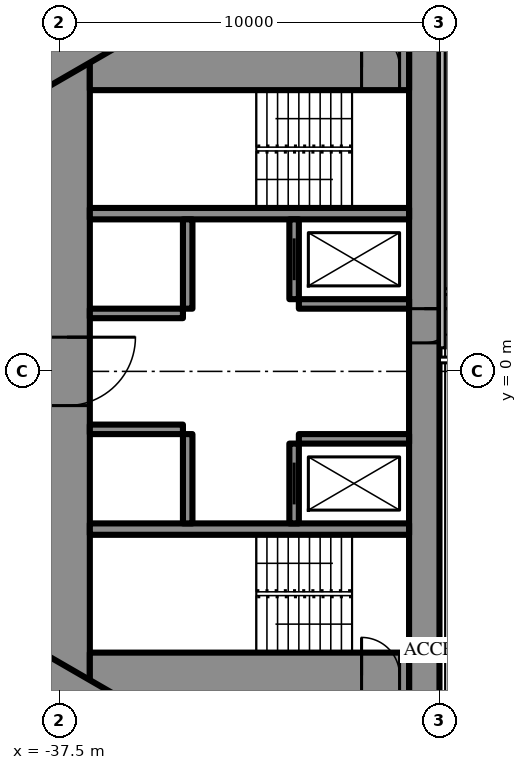
"""IFC4 building model, lengths in metres.
Left out: names, types, materials, properties, quantities, classifications, styles, units other than length and angle.
Written with IfcOpenShell. Run it as: python <this file> out.ifc"""

import sys

from ifc_helpers import new_model, si_unit, direction, frame, frame_2d, origin, place, context, subcontext, project, spatial, rectangle, extrude, element, fill, save


model = new_model("IFC4")
c1 = context("Model", 3, precision=1e-05, world=origin(), true_north=direction((0.0, 1.0)))
c2 = subcontext(c1, "Body", "Model", "MODEL_VIEW")
j1 = project(units=[si_unit("LENGTHUNIT", "METRE"), si_unit("PLANEANGLEUNIT", "RADIAN")], contexts=[c1])
p1 = place(None, origin())
s1 = spatial("IfcSite", under=j1, at=p1, CompositionType="ELEMENT")
p2 = place(p1, origin())
s2 = spatial("IfcBuilding", under=s1, at=p2, CompositionType="ELEMENT")
p3 = place(p2, frame((0.0, 0.0, 218.9)))
s3 = spatial("IfcBuildingStorey", under=s2, at=p3, CompositionType="ELEMENT", Elevation=218.9)
p4 = place(p3, frame((-27.9, 8.6, 0.0), z_axis=(0.0, 0.0, 1.0), x_axis=(0.0, -1.0, 0.0)))
e1 = element("IfcWall", 1, at=p4, inside=s3, PredefinedType="SHEAR", context=c2, shape_type="SweptSolid", body=[
    extrude(rectangle(XDim=17.2, YDim=0.8, at=frame_2d((8.6, 0.0))), origin(), (0.0, 0.0, 1.0), 3.6),
])
p5 = place(p4, frame((6.95, 0.0, 0.0)))
e2 = element("IfcOpeningElement", 2, at=p5, cuts=e1, PredefinedType="OPENING", context=c2, shape_type="SweptSolid", body=[
    extrude(rectangle(XDim=0.9, YDim=2.2, at=frame_2d((0.45, 1.1))), frame((0.0, 0.41, 0.0), z_axis=(0.0, -1.0, 0.0), x_axis=(1.0, 0.0, 0.0)), (0.0, 0.0, 1.0), 0.82),
])
p6 = place(p3, frame((-37.3, 8.6, 0.0), z_axis=(0.0, 0.0, 1.0), x_axis=(0.0, -1.0, 0.0)))
e3 = element("IfcWall", 3, at=p6, inside=s3, PredefinedType="SHEAR", context=c2, shape_type="SweptSolid", body=[
    extrude(rectangle(XDim=17.2, YDim=1.2, at=frame_2d((8.6, 0.0))), origin(), (0.0, 0.0, 1.0), 3.6),
])
p7 = place(p6, frame((7.7, 0.0, 0.0)))
e4 = element("IfcOpeningElement", 4, at=p7, cuts=e3, PredefinedType="OPENING", context=c2, shape_type="SweptSolid", body=[
    extrude(rectangle(XDim=1.8, YDim=2.2, at=frame_2d((0.9, 1.1))), frame((0.0, 0.61, 0.0), z_axis=(0.0, -1.0, 0.0), x_axis=(1.0, 0.0, 0.0)), (0.0, 0.0, 1.0), 1.22),
])
p8 = place(p3, frame((-28.3, 8.0, 0.0), z_axis=(0.0, 0.0, 1.0), x_axis=(-1.0, 0.0, 0.0)))
e5 = element("IfcWall", 5, at=p8, inside=s3, PredefinedType="SHEAR", context=c2, shape_type="SweptSolid", body=[
    extrude(rectangle(XDim=8.4, YDim=1.2, at=frame_2d((4.2, 0.0))), origin(), (0.0, 0.0, 1.0), 3.6),
])
p9 = place(p8, frame((0.25, 0.0, 0.0)))
e6 = element("IfcOpeningElement", 6, at=p9, cuts=e5, PredefinedType="OPENING", context=c2, shape_type="SweptSolid", body=[
    extrude(rectangle(XDim=1.0, YDim=2.2, at=frame_2d((0.5, 1.1))), frame((0.0, 0.61, 0.0), z_axis=(0.0, -1.0, 0.0), x_axis=(1.0, 0.0, 0.0)), (0.0, 0.0, 1.0), 1.22),
])
p10 = place(p3, frame((-28.3, -8.0, 0.0), z_axis=(0.0, 0.0, 1.0), x_axis=(-1.0, 0.0, 0.0)))
e7 = element("IfcWall", 7, at=p10, inside=s3, PredefinedType="SHEAR", context=c2, shape_type="SweptSolid", body=[
    extrude(rectangle(XDim=8.4, YDim=1.2, at=frame_2d((4.2, 0.0))), origin(), (0.0, 0.0, 1.0), 3.6),
])
p11 = place(p10, frame((0.25, 0.0, 0.0)))
e8 = element("IfcOpeningElement", 8, at=p11, cuts=e7, PredefinedType="OPENING", context=c2, shape_type="SweptSolid", body=[
    extrude(rectangle(XDim=1.0, YDim=2.2, at=frame_2d((0.5, 1.1))), frame((0.0, 0.61, 0.0), z_axis=(0.0, -1.0, 0.0), x_axis=(1.0, 0.0, 0.0)), (0.0, 0.0, 1.0), 1.22),
])
for number, where, z_axis, x_axis in (
    (9, (-28.3, 4.15, 0.0), (0.0, 0.0, 1.0), (-1.0, 0.0, 0.0)),
    (10, (-28.3, -4.15, 0.0), (0.0, 0.0, 1.0), (-1.0, 0.0, 0.0)),
):
    element("IfcWall", number, at=place(p3, frame(where, z_axis=z_axis, x_axis=x_axis)), inside=s3, PredefinedType="SHEAR", context=c2, shape_type="SweptSolid", body=[
        extrude(rectangle(XDim=8.4, YDim=0.3, at=frame_2d((4.2, 0.0))), origin(), (0.0, 0.0, 1.0), 3.6),
    ])
p12 = place(p3, frame((-31.325, 4.0, 0.0), z_axis=(0.0, 0.0, 1.0), x_axis=(0.0, -1.0, 0.0)))
e11 = element("IfcWall", 11, at=p12, inside=s3, PredefinedType="SHEAR", context=c2, shape_type="SweptSolid", body=[
    extrude(rectangle(XDim=2.1, YDim=0.25, at=frame_2d((1.05, 0.0))), origin(), (0.0, 0.0, 1.0), 3.6),
])
p13 = place(p12, frame((0.5, 0.0, 0.0)))
e12 = element("IfcOpeningElement", 12, at=p13, cuts=e11, PredefinedType="OPENING", context=c2, shape_type="SweptSolid", body=[
    extrude(rectangle(XDim=1.1, YDim=2.2, at=frame_2d((0.55, 1.1))), frame((0.0, 0.135, 0.0), z_axis=(0.0, -1.0, 0.0), x_axis=(1.0, 0.0, 0.0)), (0.0, 0.0, 1.0), 0.27),
])
p14 = place(p3, frame((-34.125, 4.0, 0.0), z_axis=(0.0, 0.0, 1.0), x_axis=(0.0, -1.0, 0.0)))
e13 = element("IfcWall", 13, at=p14, inside=s3, PredefinedType="SHEAR", context=c2, shape_type="SweptSolid", body=[
    extrude(rectangle(XDim=2.35, YDim=0.25, at=frame_2d((1.175, 0.0))), origin(), (0.0, 0.0, 1.0), 3.6),
])
p15 = place(p3, frame((-28.3, 1.775, 0.0), z_axis=(0.0, 0.0, 1.0), x_axis=(-1.0, 0.0, 0.0)))
e14 = element("IfcWall", 14, at=p15, inside=s3, PredefinedType="SHEAR", context=c2, shape_type="SweptSolid", body=[
    extrude(rectangle(XDim=2.9, YDim=0.25, at=frame_2d((1.45, 0.0))), origin(), (0.0, 0.0, 1.0), 3.6),
])
p16 = place(p3, frame((-34.25, 1.525, 0.0), z_axis=(0.0, 0.0, 1.0), x_axis=(-1.0, 0.0, 0.0)))
e15 = element("IfcWall", 15, at=p16, inside=s3, PredefinedType="SHEAR", context=c2, shape_type="SweptSolid", body=[
    extrude(rectangle(XDim=2.45, YDim=0.25, at=frame_2d((1.225, 0.0))), origin(), (0.0, 0.0, 1.0), 3.6),
])
p17 = place(p3, frame((-31.325, -1.9, 0.0), z_axis=(0.0, 0.0, 1.0), x_axis=(0.0, -1.0, 0.0)))
e16 = element("IfcWall", 16, at=p17, inside=s3, PredefinedType="SHEAR", context=c2, shape_type="SweptSolid", body=[
    extrude(rectangle(XDim=2.1, YDim=0.25, at=frame_2d((1.05, 0.0))), origin(), (0.0, 0.0, 1.0), 3.6),
])
p18 = place(p17, frame((0.5, 0.0, 0.0)))
e17 = element("IfcOpeningElement", 17, at=p18, cuts=e16, PredefinedType="OPENING", context=c2, shape_type="SweptSolid", body=[
    extrude(rectangle(XDim=1.1, YDim=2.2, at=frame_2d((0.55, 1.1))), frame((0.0, 0.135, 0.0), z_axis=(0.0, -1.0, 0.0), x_axis=(1.0, 0.0, 0.0)), (0.0, 0.0, 1.0), 0.27),
])
p19 = place(p3, frame((-34.125, -1.65, 0.0), z_axis=(0.0, 0.0, 1.0), x_axis=(0.0, -1.0, 0.0)))
e18 = element("IfcWall", 18, at=p19, inside=s3, PredefinedType="SHEAR", context=c2, shape_type="SweptSolid", body=[
    extrude(rectangle(XDim=2.35, YDim=0.25, at=frame_2d((1.175, 0.0))), origin(), (0.0, 0.0, 1.0), 3.6),
])
p20 = place(p3, frame((-28.3, -1.775, 0.0), z_axis=(0.0, 0.0, 1.0), x_axis=(-1.0, 0.0, 0.0)))
e19 = element("IfcWall", 19, at=p20, inside=s3, PredefinedType="SHEAR", context=c2, shape_type="SweptSolid", body=[
    extrude(rectangle(XDim=2.9, YDim=0.25, at=frame_2d((1.45, 0.0))), origin(), (0.0, 0.0, 1.0), 3.6),
])
p21 = place(p3, frame((-34.25, -1.525, 0.0), z_axis=(0.0, 0.0, 1.0), x_axis=(-1.0, 0.0, 0.0)))
e20 = element("IfcWall", 20, at=p21, inside=s3, PredefinedType="SHEAR", context=c2, shape_type="SweptSolid", body=[
    extrude(rectangle(XDim=2.45, YDim=0.25, at=frame_2d((1.225, 0.0))), origin(), (0.0, 0.0, 1.0), 3.6),
])
p22 = place(p3, frame((-27.2, 14.3, 0.0), z_axis=(0.0, 0.0, 1.0), x_axis=(-0.866026593062, -0.499997940104, 0.0)))
e21 = element("IfcWall", 21, at=p22, inside=s3, PredefinedType="SHEAR", context=c2, shape_type="SweptSolid", body=[
    extrude(rectangle(XDim=28.946, YDim=1.2, at=frame_2d((14.473, 0.0))), origin(), (0.0, 0.0, 1.0), 3.6),
])
p23 = place(p22, frame((4.6, 0.0, 0.0)))
e22 = element("IfcOpeningElement", 22, at=p23, cuts=e21, PredefinedType="OPENING", context=c2, shape_type="SweptSolid", body=[
    extrude(rectangle(XDim=1.0, YDim=2.2, at=frame_2d((0.5, 1.1))), frame((0.0, 0.61, 0.0), z_axis=(0.0, -1.0, 0.0), x_axis=(1.0, 0.0, 0.0)), (0.0, 0.0, 1.0), 1.22),
])
p24 = place(p22, frame((13.395, 0.0, 0.0)))
e23 = element("IfcOpeningElement", 23, at=p24, cuts=e21, PredefinedType="OPENING", context=c2, shape_type="SweptSolid", body=[
    extrude(rectangle(XDim=1.8, YDim=2.2, at=frame_2d((0.9, 1.1))), frame((0.0, 0.61, 0.0), z_axis=(0.0, -1.0, 0.0), x_axis=(1.0, 0.0, 0.0)), (0.0, 0.0, 1.0), 1.22),
])
p25 = place(p3, frame((-27.2, -14.3, 0.0), z_axis=(0.0, 0.0, 1.0), x_axis=(-0.866024021859, 0.500002393557, 0.0)))
e24 = element("IfcWall", 24, at=p25, inside=s3, PredefinedType="SHEAR", context=c2, shape_type="SweptSolid", body=[
    extrude(rectangle(XDim=27.907, YDim=1.2, at=frame_2d((13.954, 0.0))), origin(), (0.0, 0.0, 1.0), 3.6),
])
p26 = place(p25, frame((4.6, 0.0, 0.0)))
e25 = element("IfcOpeningElement", 25, at=p26, cuts=e24, PredefinedType="OPENING", context=c2, shape_type="SweptSolid", body=[
    extrude(rectangle(XDim=1.0, YDim=2.2, at=frame_2d((0.5, 1.1))), frame((0.0, 0.61, 0.0), z_axis=(0.0, -1.0, 0.0), x_axis=(1.0, 0.0, 0.0)), (0.0, 0.0, 1.0), 1.22),
])
p27 = place(p25, frame((13.395, 0.0, 0.0)))
e26 = element("IfcOpeningElement", 26, at=p27, cuts=e24, PredefinedType="OPENING", context=c2, shape_type="SweptSolid", body=[
    extrude(rectangle(XDim=1.8, YDim=2.2, at=frame_2d((0.9, 1.1))), frame((0.0, 0.61, 0.0), z_axis=(0.0, -1.0, 0.0), x_axis=(1.0, 0.0, 0.0)), (0.0, 0.0, 1.0), 1.22),
])
p28 = place(p3, frame((-28.737, 16.068, 0.0), z_axis=(0.0, 0.0, 1.0), x_axis=(-0.866026057212, -0.499998868229, 0.0)))
e27 = element("IfcWall", 27, at=p28, inside=s3, PredefinedType="PARTITIONING", context=c2, shape_type="SweptSolid", body=[
    extrude(rectangle(XDim=32.137, YDim=0.2, at=frame_2d((16.068, 0.0))), origin(), (0.0, 0.0, 1.0), 3.35),
])
p29 = place(p28, frame((1.08, 0.0, 0.0)))
e28 = element("IfcOpeningElement", 28, at=p29, cuts=e27, PredefinedType="OPENING", context=c2, shape_type="SweptSolid", body=[
    extrude(rectangle(XDim=1.8, YDim=2.03, at=frame_2d((0.9, 1.015))), frame((0.0, 0.11, 0.0), z_axis=(0.0, -1.0, 0.0), x_axis=(1.0, 0.0, 0.0)), (0.0, 0.0, 1.0), 0.22),
])
p30 = place(p28, frame((6.86, 0.0, 0.0)))
e29 = element("IfcOpeningElement", 29, at=p30, cuts=e27, PredefinedType="OPENING", context=c2, shape_type="SweptSolid", body=[
    extrude(rectangle(XDim=1.0, YDim=2.2, at=frame_2d((0.5, 1.1))), frame((0.0, 0.11, 0.0), z_axis=(0.0, -1.0, 0.0), x_axis=(1.0, 0.0, 0.0)), (0.0, 0.0, 1.0), 0.22),
])
p31 = place(p28, frame((16.418, 0.0, 0.0)))
e30 = element("IfcOpeningElement", 30, at=p31, cuts=e27, PredefinedType="OPENING", context=c2, shape_type="SweptSolid", body=[
    extrude(rectangle(XDim=0.95, YDim=2.2, at=frame_2d((0.475, 1.1))), frame((0.0, 0.11, 0.0), z_axis=(0.0, -1.0, 0.0), x_axis=(1.0, 0.0, 0.0)), (0.0, 0.0, 1.0), 0.22),
])
p32 = place(p28, frame((20.567, 0.0, 0.0)))
e31 = element("IfcOpeningElement", 31, at=p32, cuts=e27, PredefinedType="OPENING", context=c2, shape_type="SweptSolid", body=[
    extrude(rectangle(XDim=0.95, YDim=2.2, at=frame_2d((0.475, 1.1))), frame((0.0, 0.11, 0.0), z_axis=(0.0, -1.0, 0.0), x_axis=(1.0, 0.0, 0.0)), (0.0, 0.0, 1.0), 0.22),
])
p33 = place(p28, frame((27.065, 0.0, 0.0)))
e32 = element("IfcOpeningElement", 32, at=p33, cuts=e27, PredefinedType="OPENING", context=c2, shape_type="SweptSolid", body=[
    extrude(rectangle(XDim=0.95, YDim=2.2, at=frame_2d((0.475, 1.1))), frame((0.0, 0.11, 0.0), z_axis=(0.0, -1.0, 0.0), x_axis=(1.0, 0.0, 0.0)), (0.0, 0.0, 1.0), 0.22),
])
p34 = place(p3, frame((-27.5, 0.3, 0.0), z_axis=(0.0, 0.0, 1.0), x_axis=(1.0, 0.0, 0.0)))
e33 = element("IfcWall", 33, at=p34, inside=s3, PredefinedType="PARTITIONING", context=c2, shape_type="SweptSolid", body=[
    extrude(rectangle(XDim=55.0, YDim=0.15, at=frame_2d((27.5, 0.0))), origin(), (0.0, 0.0, 1.0), 2.4),
])
p35 = place(p34, frame((1.575, 0.0, 0.0)))
e34 = element("IfcOpeningElement", 34, at=p35, cuts=e33, PredefinedType="OPENING", context=c2, shape_type="SweptSolid", body=[
    extrude(rectangle(XDim=1.0, YDim=2.2, at=frame_2d((0.5, 1.1))), frame((0.0, 0.085, 0.0), z_axis=(0.0, -1.0, 0.0), x_axis=(1.0, 0.0, 0.0)), (0.0, 0.0, 1.0), 0.17),
])
p36 = place(p34, frame((8.525, 0.0, 0.0)))
e35 = element("IfcOpeningElement", 35, at=p36, cuts=e33, PredefinedType="OPENING", context=c2, shape_type="SweptSolid", body=[
    extrude(rectangle(XDim=1.05, YDim=2.4, at=frame_2d((0.525, 1.2))), frame((0.0, 0.085, 0.0), z_axis=(0.0, -1.0, 0.0), x_axis=(1.0, 0.0, 0.0)), (0.0, 0.0, 1.0), 0.17),
])
p37 = place(p34, frame((14.025, 0.0, 0.0)))
e36 = element("IfcOpeningElement", 36, at=p37, cuts=e33, PredefinedType="OPENING", context=c2, shape_type="SweptSolid", body=[
    extrude(rectangle(XDim=1.05, YDim=2.4, at=frame_2d((0.525, 1.2))), frame((0.0, 0.085, 0.0), z_axis=(0.0, -1.0, 0.0), x_axis=(1.0, 0.0, 0.0)), (0.0, 0.0, 1.0), 0.17),
])
p38 = place(p34, frame((19.525, 0.0, 0.0)))
e37 = element("IfcOpeningElement", 37, at=p38, cuts=e33, PredefinedType="OPENING", context=c2, shape_type="SweptSolid", body=[
    extrude(rectangle(XDim=1.05, YDim=2.4, at=frame_2d((0.525, 1.2))), frame((0.0, 0.085, 0.0), z_axis=(0.0, -1.0, 0.0), x_axis=(1.0, 0.0, 0.0)), (0.0, 0.0, 1.0), 0.17),
])
p39 = place(p34, frame((25.025, 0.0, 0.0)))
e38 = element("IfcOpeningElement", 38, at=p39, cuts=e33, PredefinedType="OPENING", context=c2, shape_type="SweptSolid", body=[
    extrude(rectangle(XDim=1.05, YDim=2.4, at=frame_2d((0.525, 1.2))), frame((0.0, 0.085, 0.0), z_axis=(0.0, -1.0, 0.0), x_axis=(1.0, 0.0, 0.0)), (0.0, 0.0, 1.0), 0.17),
])
p40 = place(p34, frame((30.525, 0.0, 0.0)))
e39 = element("IfcOpeningElement", 39, at=p40, cuts=e33, PredefinedType="OPENING", context=c2, shape_type="SweptSolid", body=[
    extrude(rectangle(XDim=1.05, YDim=2.4, at=frame_2d((0.525, 1.2))), frame((0.0, 0.085, 0.0), z_axis=(0.0, -1.0, 0.0), x_axis=(1.0, 0.0, 0.0)), (0.0, 0.0, 1.0), 0.17),
])
p41 = place(p34, frame((36.025, 0.0, 0.0)))
e40 = element("IfcOpeningElement", 40, at=p41, cuts=e33, PredefinedType="OPENING", context=c2, shape_type="SweptSolid", body=[
    extrude(rectangle(XDim=1.05, YDim=2.4, at=frame_2d((0.525, 1.2))), frame((0.0, 0.085, 0.0), z_axis=(0.0, -1.0, 0.0), x_axis=(1.0, 0.0, 0.0)), (0.0, 0.0, 1.0), 0.17),
])
p42 = place(p34, frame((41.525, 0.0, 0.0)))
e41 = element("IfcOpeningElement", 41, at=p42, cuts=e33, PredefinedType="OPENING", context=c2, shape_type="SweptSolid", body=[
    extrude(rectangle(XDim=1.05, YDim=2.4, at=frame_2d((0.525, 1.2))), frame((0.0, 0.085, 0.0), z_axis=(0.0, -1.0, 0.0), x_axis=(1.0, 0.0, 0.0)), (0.0, 0.0, 1.0), 0.17),
])
p43 = place(p34, frame((47.025, 0.0, 0.0)))
e42 = element("IfcOpeningElement", 42, at=p43, cuts=e33, PredefinedType="OPENING", context=c2, shape_type="SweptSolid", body=[
    extrude(rectangle(XDim=1.05, YDim=2.4, at=frame_2d((0.525, 1.2))), frame((0.0, 0.085, 0.0), z_axis=(0.0, -1.0, 0.0), x_axis=(1.0, 0.0, 0.0)), (0.0, 0.0, 1.0), 0.17),
])
p44 = place(p34, frame((52.525, 0.0, 0.0)))
e43 = element("IfcOpeningElement", 43, at=p44, cuts=e33, PredefinedType="OPENING", context=c2, shape_type="SweptSolid", body=[
    extrude(rectangle(XDim=1.05, YDim=2.4, at=frame_2d((0.525, 1.2))), frame((0.0, 0.085, 0.0), z_axis=(0.0, -1.0, 0.0), x_axis=(1.0, 0.0, 0.0)), (0.0, 0.0, 1.0), 0.17),
])
p45 = place(p3, frame((-27.5, 2.1, 0.0), z_axis=(0.0, 0.0, 1.0), x_axis=(1.0, 0.0, 0.0)))
e44 = element("IfcWall", 44, at=p45, inside=s3, PredefinedType="PARTITIONING", context=c2, shape_type="SweptSolid", body=[
    extrude(rectangle(XDim=55.0, YDim=0.15, at=frame_2d((27.5, 0.0))), origin(), (0.0, 0.0, 1.0), 3.4),
])
p46 = place(p45, frame((2.025, 0.0, 0.0)))
e45 = element("IfcOpeningElement", 45, at=p46, cuts=e44, PredefinedType="OPENING", context=c2, shape_type="SweptSolid", body=[
    extrude(rectangle(XDim=1.05, YDim=2.4, at=frame_2d((0.525, 1.2))), frame((0.0, 0.085, 0.0), z_axis=(0.0, -1.0, 0.0), x_axis=(1.0, 0.0, 0.0)), (0.0, 0.0, 1.0), 0.17),
])
p47 = place(p45, frame((8.525, 0.0, 0.0)))
e46 = element("IfcOpeningElement", 46, at=p47, cuts=e44, PredefinedType="OPENING", context=c2, shape_type="SweptSolid", body=[
    extrude(rectangle(XDim=1.05, YDim=2.4, at=frame_2d((0.525, 1.2))), frame((0.0, 0.085, 0.0), z_axis=(0.0, -1.0, 0.0), x_axis=(1.0, 0.0, 0.0)), (0.0, 0.0, 1.0), 0.17),
])
p48 = place(p45, frame((14.025, 0.0, 0.0)))
e47 = element("IfcOpeningElement", 47, at=p48, cuts=e44, PredefinedType="OPENING", context=c2, shape_type="SweptSolid", body=[
    extrude(rectangle(XDim=1.05, YDim=2.4, at=frame_2d((0.525, 1.2))), frame((0.0, 0.085, 0.0), z_axis=(0.0, -1.0, 0.0), x_axis=(1.0, 0.0, 0.0)), (0.0, 0.0, 1.0), 0.17),
])
p49 = place(p45, frame((19.525, 0.0, 0.0)))
e48 = element("IfcOpeningElement", 48, at=p49, cuts=e44, PredefinedType="OPENING", context=c2, shape_type="SweptSolid", body=[
    extrude(rectangle(XDim=1.05, YDim=2.4, at=frame_2d((0.525, 1.2))), frame((0.0, 0.085, 0.0), z_axis=(0.0, -1.0, 0.0), x_axis=(1.0, 0.0, 0.0)), (0.0, 0.0, 1.0), 0.17),
])
p50 = place(p45, frame((25.025, 0.0, 0.0)))
e49 = element("IfcOpeningElement", 49, at=p50, cuts=e44, PredefinedType="OPENING", context=c2, shape_type="SweptSolid", body=[
    extrude(rectangle(XDim=1.05, YDim=2.4, at=frame_2d((0.525, 1.2))), frame((0.0, 0.085, 0.0), z_axis=(0.0, -1.0, 0.0), x_axis=(1.0, 0.0, 0.0)), (0.0, 0.0, 1.0), 0.17),
])
p51 = place(p45, frame((30.525, 0.0, 0.0)))
e50 = element("IfcOpeningElement", 50, at=p51, cuts=e44, PredefinedType="OPENING", context=c2, shape_type="SweptSolid", body=[
    extrude(rectangle(XDim=1.05, YDim=2.4, at=frame_2d((0.525, 1.2))), frame((0.0, 0.085, 0.0), z_axis=(0.0, -1.0, 0.0), x_axis=(1.0, 0.0, 0.0)), (0.0, 0.0, 1.0), 0.17),
])
p52 = place(p45, frame((36.025, 0.0, 0.0)))
e51 = element("IfcOpeningElement", 51, at=p52, cuts=e44, PredefinedType="OPENING", context=c2, shape_type="SweptSolid", body=[
    extrude(rectangle(XDim=1.05, YDim=2.4, at=frame_2d((0.525, 1.2))), frame((0.0, 0.085, 0.0), z_axis=(0.0, -1.0, 0.0), x_axis=(1.0, 0.0, 0.0)), (0.0, 0.0, 1.0), 0.17),
])
p53 = place(p45, frame((41.525, 0.0, 0.0)))
e52 = element("IfcOpeningElement", 52, at=p53, cuts=e44, PredefinedType="OPENING", context=c2, shape_type="SweptSolid", body=[
    extrude(rectangle(XDim=1.05, YDim=2.4, at=frame_2d((0.525, 1.2))), frame((0.0, 0.085, 0.0), z_axis=(0.0, -1.0, 0.0), x_axis=(1.0, 0.0, 0.0)), (0.0, 0.0, 1.0), 0.17),
])
p54 = place(p45, frame((47.025, 0.0, 0.0)))
e53 = element("IfcOpeningElement", 53, at=p54, cuts=e44, PredefinedType="OPENING", context=c2, shape_type="SweptSolid", body=[
    extrude(rectangle(XDim=1.05, YDim=2.4, at=frame_2d((0.525, 1.2))), frame((0.0, 0.085, 0.0), z_axis=(0.0, -1.0, 0.0), x_axis=(1.0, 0.0, 0.0)), (0.0, 0.0, 1.0), 0.17),
])
p55 = place(p45, frame((52.525, 0.0, 0.0)))
e54 = element("IfcOpeningElement", 54, at=p55, cuts=e44, PredefinedType="OPENING", context=c2, shape_type="SweptSolid", body=[
    extrude(rectangle(XDim=1.05, YDim=2.4, at=frame_2d((0.525, 1.2))), frame((0.0, 0.085, 0.0), z_axis=(0.0, -1.0, 0.0), x_axis=(1.0, 0.0, 0.0)), (0.0, 0.0, 1.0), 0.17),
])
p56 = place(p7, origin())
e55 = element("IfcDoor", 55, at=p56, inside=s3, OperationType="DOUBLE_DOOR_SINGLE_SWING", PredefinedType="DOOR", context=c2, shape_type="SweptSolid", body=[
    extrude(rectangle(XDim=1.8, YDim=2.2, at=frame_2d((0.9, 1.1))), frame((0.0, 0.025, 0.0), z_axis=(0.0, -1.0, 0.0), x_axis=(1.0, 0.0, 0.0)), (0.0, 0.0, 1.0), 0.05),
])
fill(e4, e55)
p57 = place(p9, origin())
e56 = element("IfcDoor", 56, at=p57, inside=s3, OperationType="SINGLE_SWING_RIGHT", PredefinedType="DOOR", context=c2, shape_type="SweptSolid", body=[
    extrude(rectangle(XDim=1.0, YDim=2.2, at=frame_2d((0.5, 1.1))), frame((0.0, 0.025, 0.0), z_axis=(0.0, -1.0, 0.0), x_axis=(1.0, 0.0, 0.0)), (0.0, 0.0, 1.0), 0.05),
])
fill(e6, e56)
p58 = place(p11, origin())
e57 = element("IfcDoor", 57, at=p58, inside=s3, OperationType="SINGLE_SWING_RIGHT", PredefinedType="DOOR", context=c2, shape_type="SweptSolid", body=[
    extrude(rectangle(XDim=1.0, YDim=2.2, at=frame_2d((0.5, 1.1))), frame((0.0, 0.025, 0.0), z_axis=(0.0, -1.0, 0.0), x_axis=(1.0, 0.0, 0.0)), (0.0, 0.0, 1.0), 0.05),
])
fill(e8, e57)
p59 = place(p5, origin())
e58 = element("IfcDoor", 58, at=p59, inside=s3, OperationType="SINGLE_SWING_LEFT", PredefinedType="DOOR", context=c2, shape_type="SweptSolid", body=[
    extrude(rectangle(XDim=0.9, YDim=2.2, at=frame_2d((0.45, 1.1))), frame((0.0, 0.025, 0.0), z_axis=(0.0, -1.0, 0.0), x_axis=(1.0, 0.0, 0.0)), (0.0, 0.0, 1.0), 0.05),
])
fill(e2, e58)
p60 = place(p13, origin())
e59 = element("IfcDoor", 59, at=p60, inside=s3, OperationType="SLIDING_TO_LEFT", PredefinedType="USERDEFINED", context=c2, shape_type="SweptSolid", body=[
    extrude(rectangle(XDim=1.1, YDim=2.2, at=frame_2d((0.55, 1.1))), frame((0.0, 0.025, 0.0), z_axis=(0.0, -1.0, 0.0), x_axis=(1.0, 0.0, 0.0)), (0.0, 0.0, 1.0), 0.05),
])
fill(e12, e59)
p61 = place(p18, origin())
e60 = element("IfcDoor", 60, at=p61, inside=s3, OperationType="SLIDING_TO_LEFT", PredefinedType="USERDEFINED", context=c2, shape_type="SweptSolid", body=[
    extrude(rectangle(XDim=1.1, YDim=2.2, at=frame_2d((0.55, 1.1))), frame((0.0, 0.025, 0.0), z_axis=(0.0, -1.0, 0.0), x_axis=(1.0, 0.0, 0.0)), (0.0, 0.0, 1.0), 0.05),
])
fill(e17, e60)
save(model, sys.argv[1])
